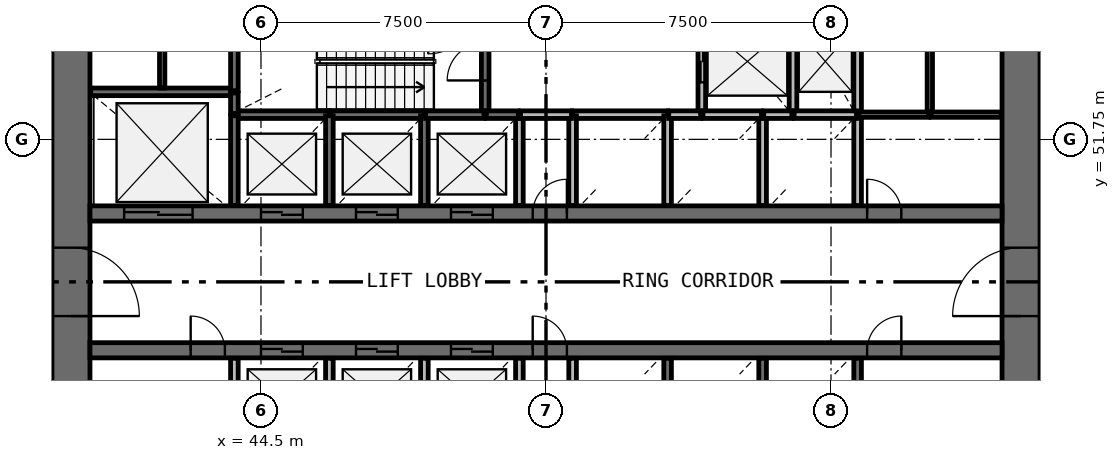
"""IFC4 building model, lengths in metres.
Left out: names, types, materials, properties, quantities, classifications, styles, units other than length and angle.
Written with IfcOpenShell. Run it as: python <this file> out.ifc"""

import sys

from ifc_helpers import new_model, si_unit, direction, frame, frame_2d, origin, place, context, subcontext, project, spatial, rectangle, extrude, source, transform, mapped, element, fill, save


model = new_model("IFC4")
c1 = context("Model", 3, precision=1e-05, world=origin(), true_north=direction((0.0, 1.0)))
c2 = subcontext(c1, "Body", "Model", "MODEL_VIEW")
j1 = project(units=[si_unit("LENGTHUNIT", "METRE"), si_unit("PLANEANGLEUNIT", "RADIAN")], contexts=[c1])
p1 = place(None, origin())
s1 = spatial("IfcSite", under=j1, at=p1, CompositionType="ELEMENT")
p2 = place(p1, origin())
s2 = spatial("IfcBuilding", under=s1, at=p2, CompositionType="ELEMENT")
p3 = place(p2, frame((0.0, 0.0, 22.6)))
s3 = spatial("IfcBuildingStorey", under=s2, at=p3, CompositionType="ELEMENT", Elevation=22.6)
p4 = place(p3, frame((64.5, 38.0, 0.0), z_axis=(0.0, 0.0, 1.0), x_axis=(0.0, 1.0, 0.0)))
e1 = element("IfcWall", 1, at=p4, inside=s3, PredefinedType="SHEAR", context=c2, shape_type="SweptSolid", body=[
    extrude(rectangle(XDim=20.0, YDim=1.0, at=frame_2d((10.0, 0.0))), origin(), (0.0, 0.0, 1.0), 4.4),
])
p5 = place(p4, frame((9.1, 0.0, 0.0)))
e2 = element("IfcOpeningElement", 2, at=p5, cuts=e1, PredefinedType="OPENING", context=c2, shape_type="SweptSolid", body=[
    extrude(rectangle(XDim=1.8, YDim=2.1, at=frame_2d((0.9, 1.05))), frame((0.0, 0.51, 0.0), z_axis=(0.0, -1.0, 0.0), x_axis=(1.0, 0.0, 0.0)), (0.0, 0.0, 1.0), 1.02),
])
p6 = place(p3, frame((39.5, 58.0, 0.0), z_axis=(0.0, 0.0, 1.0), x_axis=(0.0, -1.0, 0.0)))
e3 = element("IfcWall", 3, at=p6, inside=s3, PredefinedType="SHEAR", context=c2, shape_type="SweptSolid", body=[
    extrude(rectangle(XDim=20.0, YDim=1.0, at=frame_2d((10.0, 0.0))), origin(), (0.0, 0.0, 1.0), 4.4),
])
p7 = place(p6, frame((9.1, 0.0, 0.0)))
e4 = element("IfcOpeningElement", 4, at=p7, cuts=e3, PredefinedType="OPENING", context=c2, shape_type="SweptSolid", body=[
    extrude(rectangle(XDim=1.8, YDim=2.1, at=frame_2d((0.9, 1.05))), frame((0.0, 0.51, 0.0), z_axis=(0.0, -1.0, 0.0), x_axis=(1.0, 0.0, 0.0)), (0.0, 0.0, 1.0), 1.02),
])
p8 = place(p3, frame((40.0, 49.8, 0.0), z_axis=(0.0, 0.0, 1.0), x_axis=(1.0, 0.0, 0.0)))
e5 = element("IfcWall", 5, at=p8, inside=s3, PredefinedType="SHEAR", context=c2, shape_type="SweptSolid", body=[
    extrude(rectangle(XDim=24.0, YDim=0.4, at=frame_2d((12.0, 0.0))), origin(), (0.0, 0.0, 1.0), 4.4),
])
p9 = place(p8, frame((4.5, 0.0, 0.0)))
e6 = element("IfcOpeningElement", 6, at=p9, cuts=e5, PredefinedType="OPENING", context=c2, shape_type="SweptSolid", body=[
    extrude(rectangle(XDim=1.1, YDim=2.1, at=frame_2d((0.55, 1.05))), frame((0.0, 0.21, 0.0), z_axis=(0.0, -1.0, 0.0), x_axis=(1.0, 0.0, 0.0)), (0.0, 0.0, 1.0), 0.42),
])
p10 = place(p8, frame((7.0, 0.0, 0.0)))
e7 = element("IfcOpeningElement", 7, at=p10, cuts=e5, PredefinedType="OPENING", context=c2, shape_type="SweptSolid", body=[
    extrude(rectangle(XDim=1.1, YDim=2.1, at=frame_2d((0.55, 1.05))), frame((0.0, 0.21, 0.0), z_axis=(0.0, -1.0, 0.0), x_axis=(1.0, 0.0, 0.0)), (0.0, 0.0, 1.0), 0.42),
])
p11 = place(p8, frame((9.5, 0.0, 0.0)))
e8 = element("IfcOpeningElement", 8, at=p11, cuts=e5, PredefinedType="OPENING", context=c2, shape_type="SweptSolid", body=[
    extrude(rectangle(XDim=1.1, YDim=2.1, at=frame_2d((0.55, 1.05))), frame((0.0, 0.21, 0.0), z_axis=(0.0, -1.0, 0.0), x_axis=(1.0, 0.0, 0.0)), (0.0, 0.0, 1.0), 0.42),
])
p12 = place(p8, frame((0.9, 0.0, 0.0)))
e9 = element("IfcOpeningElement", 9, at=p12, cuts=e5, PredefinedType="OPENING", context=c2, shape_type="SweptSolid", body=[
    extrude(rectangle(XDim=1.8, YDim=2.4, at=frame_2d((0.9, 1.2))), frame((0.0, 0.21, 0.0), z_axis=(0.0, -1.0, 0.0), x_axis=(1.0, 0.0, 0.0)), (0.0, 0.0, 1.0), 0.42),
])
p13 = place(p8, frame((20.45, 0.0, 0.0)))
e10 = element("IfcOpeningElement", 10, at=p13, cuts=e5, PredefinedType="OPENING", context=c2, shape_type="SweptSolid", body=[
    extrude(rectangle(XDim=0.9, YDim=2.1, at=frame_2d((0.45, 1.05))), frame((0.0, 0.21, 0.0), z_axis=(0.0, -1.0, 0.0), x_axis=(1.0, 0.0, 0.0)), (0.0, 0.0, 1.0), 0.42),
])
p14 = place(p8, frame((11.65, 0.0, 0.0)))
e11 = element("IfcOpeningElement", 11, at=p14, cuts=e5, PredefinedType="OPENING", context=c2, shape_type="SweptSolid", body=[
    extrude(rectangle(XDim=0.9, YDim=2.1, at=frame_2d((0.45, 1.05))), frame((0.0, 0.21, 0.0), z_axis=(0.0, -1.0, 0.0), x_axis=(1.0, 0.0, 0.0)), (0.0, 0.0, 1.0), 0.42),
])
p15 = place(p3, frame((40.0, 46.2, 0.0), z_axis=(0.0, 0.0, 1.0), x_axis=(1.0, 0.0, 0.0)))
e12 = element("IfcWall", 12, at=p15, inside=s3, PredefinedType="SHEAR", context=c2, shape_type="SweptSolid", body=[
    extrude(rectangle(XDim=24.0, YDim=0.4, at=frame_2d((12.0, 0.0))), origin(), (0.0, 0.0, 1.0), 4.4),
])
p16 = place(p15, frame((4.5, 0.0, 0.0)))
e13 = element("IfcOpeningElement", 13, at=p16, cuts=e12, PredefinedType="OPENING", context=c2, shape_type="SweptSolid", body=[
    extrude(rectangle(XDim=1.1, YDim=2.1, at=frame_2d((0.55, 1.05))), frame((0.0, 0.21, 0.0), z_axis=(0.0, -1.0, 0.0), x_axis=(1.0, 0.0, 0.0)), (0.0, 0.0, 1.0), 0.42),
])
p17 = place(p15, frame((7.0, 0.0, 0.0)))
e14 = element("IfcOpeningElement", 14, at=p17, cuts=e12, PredefinedType="OPENING", context=c2, shape_type="SweptSolid", body=[
    extrude(rectangle(XDim=1.1, YDim=2.1, at=frame_2d((0.55, 1.05))), frame((0.0, 0.21, 0.0), z_axis=(0.0, -1.0, 0.0), x_axis=(1.0, 0.0, 0.0)), (0.0, 0.0, 1.0), 0.42),
])
p18 = place(p15, frame((9.5, 0.0, 0.0)))
e15 = element("IfcOpeningElement", 15, at=p18, cuts=e12, PredefinedType="OPENING", context=c2, shape_type="SweptSolid", body=[
    extrude(rectangle(XDim=1.1, YDim=2.1, at=frame_2d((0.55, 1.05))), frame((0.0, 0.21, 0.0), z_axis=(0.0, -1.0, 0.0), x_axis=(1.0, 0.0, 0.0)), (0.0, 0.0, 1.0), 0.42),
])
p19 = place(p15, frame((20.45, 0.0, 0.0)))
e16 = element("IfcOpeningElement", 16, at=p19, cuts=e12, PredefinedType="OPENING", context=c2, shape_type="SweptSolid", body=[
    extrude(rectangle(XDim=0.9, YDim=2.1, at=frame_2d((0.45, 1.05))), frame((0.0, 0.21, 0.0), z_axis=(0.0, -1.0, 0.0), x_axis=(1.0, 0.0, 0.0)), (0.0, 0.0, 1.0), 0.42),
])
p20 = place(p15, frame((2.65, 0.0, 0.0)))
e17 = element("IfcOpeningElement", 17, at=p20, cuts=e12, PredefinedType="OPENING", context=c2, shape_type="SweptSolid", body=[
    extrude(rectangle(XDim=0.9, YDim=2.1, at=frame_2d((0.45, 1.05))), frame((0.0, 0.21, 0.0), z_axis=(0.0, -1.0, 0.0), x_axis=(1.0, 0.0, 0.0)), (0.0, 0.0, 1.0), 0.42),
])
p21 = place(p15, frame((11.65, 0.0, 0.0)))
e18 = element("IfcOpeningElement", 18, at=p21, cuts=e12, PredefinedType="OPENING", context=c2, shape_type="SweptSolid", body=[
    extrude(rectangle(XDim=0.9, YDim=2.1, at=frame_2d((0.45, 1.05))), frame((0.0, 0.21, 0.0), z_axis=(0.0, -1.0, 0.0), x_axis=(1.0, 0.0, 0.0)), (0.0, 0.0, 1.0), 0.42),
])
p22 = place(p3, frame((43.8, 53.0, 0.0), z_axis=(0.0, 0.0, 1.0), x_axis=(-1.0, 0.0, 0.0)))
e19 = element("IfcWall", 19, at=p22, inside=s3, PredefinedType="SOLIDWALL", context=c2, shape_type="SweptSolid", body=[
    extrude(rectangle(XDim=3.78, YDim=0.2, at=frame_2d((1.89, 0.0))), origin(), (0.0, 0.0, 1.0), 3.95),
])
p23 = place(p3, frame((50.4, 52.4, 0.0), z_axis=(0.0, 0.0, 1.0), x_axis=(0.0, 1.0, 0.0)))
e20 = element("IfcWall", 20, at=p23, inside=s3, PredefinedType="SOLIDWALL", context=c2, shape_type="SweptSolid", body=[
    extrude(rectangle(XDim=2.77, YDim=0.2, at=frame_2d((1.385, 0.0))), origin(), (0.0, 0.0, 1.0), 3.95),
])
p24 = place(p23, frame((0.9, 0.0, 0.0)))
e21 = element("IfcOpeningElement", 21, at=p24, cuts=e20, PredefinedType="OPENING", context=c2, shape_type="SweptSolid", body=[
    extrude(rectangle(XDim=1.0, YDim=2.1, at=frame_2d((0.5, 1.05))), frame((0.0, 0.11, 0.0), z_axis=(0.0, -1.0, 0.0), x_axis=(1.0, 0.0, 0.0)), (0.0, 0.0, 1.0), 0.22),
])
p25 = place(p3, frame((56.1, 55.17, 0.0), z_axis=(0.0, 0.0, 1.0), x_axis=(0.0, -1.0, 0.0)))
e22 = element("IfcWall", 22, at=p25, inside=s3, PredefinedType="SOLIDWALL", context=c2, shape_type="SweptSolid", body=[
    extrude(rectangle(XDim=2.77, YDim=0.2, at=frame_2d((1.385, 0.0))), origin(), (0.0, 0.0, 1.0), 3.95),
])
p26 = place(p25, frame((0.82, 0.0, 0.0)))
e23 = element("IfcOpeningElement", 23, at=p26, cuts=e22, PredefinedType="OPENING", context=c2, shape_type="SweptSolid", body=[
    extrude(rectangle(XDim=1.1, YDim=2.1, at=frame_2d((0.55, 1.05))), frame((0.0, 0.11, 0.0), z_axis=(0.0, -1.0, 0.0), x_axis=(1.0, 0.0, 0.0)), (0.0, 0.0, 1.0), 0.22),
])
for number, where, z_axis, x_axis in (
    (24, (58.5, 52.4, 0.0), (0.0, 0.0, 1.0), (0.0, 1.0, 0.0)),
    (25, (60.2, 52.4, 0.0), (0.0, 0.0, 1.0), (0.0, 1.0, 0.0)),
):
    element("IfcWall", number, at=place(p3, frame(where, z_axis=z_axis, x_axis=x_axis)), inside=s3, PredefinedType="SOLIDWALL", context=c2, shape_type="SweptSolid", body=[
        extrude(rectangle(XDim=2.8, YDim=0.2, at=frame_2d((1.4, 0.0))), origin(), (0.0, 0.0, 1.0), 3.95),
    ])
p27 = place(p3, frame((46.3, 52.4, 0.0), z_axis=(0.0, 0.0, 1.0), x_axis=(-1.0, 0.0, 0.0)))
e26 = element("IfcWall", 26, at=p27, inside=s3, PredefinedType="SOLIDWALL", context=c2, shape_type="SweptSolid", body=[
    extrude(rectangle(XDim=2.5, YDim=0.2, at=frame_2d((1.25, 0.0))), origin(), (0.0, 0.0, 1.0), 3.95),
])
p28 = place(p3, frame((48.8, 52.4, 0.0), z_axis=(0.0, 0.0, 1.0), x_axis=(-1.0, 0.0, 0.0)))
e27 = element("IfcWall", 27, at=p28, inside=s3, PredefinedType="SOLIDWALL", context=c2, shape_type="SweptSolid", body=[
    extrude(rectangle(XDim=2.47, YDim=0.2, at=frame_2d((1.235, 0.0))), origin(), (0.0, 0.0, 1.0), 3.95),
])
p29 = place(p3, frame((55.2, 52.4, 0.0), z_axis=(0.0, 0.0, 1.0), x_axis=(-1.0, 0.0, 0.0)))
e28 = element("IfcWall", 28, at=p29, inside=s3, PredefinedType="SOLIDWALL", context=c2, shape_type="SweptSolid", body=[
    extrude(rectangle(XDim=2.5, YDim=0.2, at=frame_2d((1.25, 0.0))), origin(), (0.0, 0.0, 1.0), 3.95),
])
for number, where, z_axis, x_axis in (
    (29, (43.8, 45.99, 0.0), (0.0, 0.0, 1.0), (0.0, -1.0, 0.0)),
    (30, (43.8, 52.37, 0.0), (0.0, 0.0, 1.0), (0.0, -1.0, 0.0)),
):
    element("IfcWall", number, at=place(p3, frame(where, z_axis=z_axis, x_axis=x_axis)), inside=s3, PredefinedType="SOLIDWALL", context=c2, shape_type="SweptSolid", body=[
        extrude(rectangle(XDim=2.36, YDim=0.2, at=frame_2d((1.18, 0.0))), origin(), (0.0, 0.0, 1.0), 3.95),
    ])
p30 = place(p3, frame((46.3, 43.6, 0.0), z_axis=(0.0, 0.0, 1.0), x_axis=(0.0, 1.0, 0.0)))
e31 = element("IfcWall", 31, at=p30, inside=s3, PredefinedType="SOLIDWALL", context=c2, shape_type="SweptSolid", body=[
    extrude(rectangle(XDim=2.39, YDim=0.2, at=frame_2d((1.195, 0.0))), origin(), (0.0, 0.0, 1.0), 3.95),
])
for number, where, z_axis, x_axis in (
    (32, (46.3, 50.01, 0.0), (0.0, 0.0, 1.0), (0.0, 1.0, 0.0)),
    (33, (48.8, 43.63, 0.0), (0.0, 0.0, 1.0), (0.0, 1.0, 0.0)),
    (34, (48.8, 50.01, 0.0), (0.0, 0.0, 1.0), (0.0, 1.0, 0.0)),
    (35, (51.3, 43.63, 0.0), (0.0, 0.0, 1.0), (0.0, 1.0, 0.0)),
):
    element("IfcWall", number, at=place(p3, frame(where, z_axis=z_axis, x_axis=x_axis)), inside=s3, PredefinedType="SOLIDWALL", context=c2, shape_type="SweptSolid", body=[
        extrude(rectangle(XDim=2.36, YDim=0.2, at=frame_2d((1.18, 0.0))), origin(), (0.0, 0.0, 1.0), 3.95),
    ])
for number, where, z_axis, x_axis in (
    (36, (51.3, 50.01, 0.0), (0.0, 0.0, 1.0), (0.0, 1.0, 0.0)),
    (37, (52.7, 45.99, 0.0), (0.0, 0.0, 1.0), (0.0, -1.0, 0.0)),
):
    element("IfcWall", number, at=place(p3, frame(where, z_axis=z_axis, x_axis=x_axis)), inside=s3, PredefinedType="SOLIDWALL", context=c2, shape_type="SweptSolid", body=[
        extrude(rectangle(XDim=2.39, YDim=0.2, at=frame_2d((1.195, 0.0))), origin(), (0.0, 0.0, 1.0), 3.95),
    ])
for number, where, z_axis, x_axis in (
    (38, (52.7, 52.37, 0.0), (0.0, 0.0, 1.0), (0.0, -1.0, 0.0)),
    (39, (55.2, 43.63, 0.0), (0.0, 0.0, 1.0), (0.0, 1.0, 0.0)),
    (40, (55.2, 50.01, 0.0), (0.0, 0.0, 1.0), (0.0, 1.0, 0.0)),
    (41, (57.7, 43.63, 0.0), (0.0, 0.0, 1.0), (0.0, 1.0, 0.0)),
):
    element("IfcWall", number, at=place(p3, frame(where, z_axis=z_axis, x_axis=x_axis)), inside=s3, PredefinedType="SOLIDWALL", context=c2, shape_type="SweptSolid", body=[
        extrude(rectangle(XDim=2.36, YDim=0.2, at=frame_2d((1.18, 0.0))), origin(), (0.0, 0.0, 1.0), 3.95),
    ])
p31 = place(p3, frame((57.7, 50.01, 0.0), z_axis=(0.0, 0.0, 1.0), x_axis=(0.0, 1.0, 0.0)))
e42 = element("IfcWall", 42, at=p31, inside=s3, PredefinedType="SOLIDWALL", context=c2, shape_type="SweptSolid", body=[
    extrude(rectangle(XDim=2.39, YDim=0.2, at=frame_2d((1.195, 0.0))), origin(), (0.0, 0.0, 1.0), 3.95),
])
for number, where, z_axis, x_axis in (
    (43, (60.2, 43.63, 0.0), (0.0, 0.0, 1.0), (0.0, 1.0, 0.0)),
    (44, (60.2, 50.01, 0.0), (0.0, 0.0, 1.0), (0.0, 1.0, 0.0)),
):
    element("IfcWall", number, at=place(p3, frame(where, z_axis=z_axis, x_axis=x_axis)), inside=s3, PredefinedType="SOLIDWALL", context=c2, shape_type="SweptSolid", body=[
        extrude(rectangle(XDim=2.36, YDim=0.2, at=frame_2d((1.18, 0.0))), origin(), (0.0, 0.0, 1.0), 3.95),
    ])
p32 = place(p3, frame((43.8, 55.17, 0.0), z_axis=(0.0, 0.0, 1.0), x_axis=(0.0, -1.0, 0.0)))
e45 = element("IfcWall", 45, at=p32, inside=s3, PredefinedType="SOLIDWALL", context=c2, shape_type="SweptSolid", body=[
    extrude(rectangle(XDim=2.14, YDim=0.2, at=frame_2d((1.07, 0.0))), origin(), (0.0, 0.0, 1.0), 3.95),
])
p33 = place(p3, frame((60.17, 52.4, 0.0), z_axis=(0.0, 0.0, 1.0), x_axis=(-1.0, 0.0, 0.0)))
e46 = element("IfcWall", 46, at=p33, inside=s3, PredefinedType="SOLIDWALL", context=c2, shape_type="SweptSolid", body=[
    extrude(rectangle(XDim=1.64, YDim=0.2, at=frame_2d((0.82, 0.0))), origin(), (0.0, 0.0, 1.0), 3.95),
])
for number, where, z_axis, x_axis in (
    (47, (50.37, 52.4, 0.0), (0.0, 0.0, 1.0), (-1.0, 0.0, 0.0)),
    (48, (57.67, 52.4, 0.0), (0.0, 0.0, 1.0), (-1.0, 0.0, 0.0)),
):
    element("IfcWall", number, at=place(p3, frame(where, z_axis=z_axis, x_axis=x_axis)), inside=s3, PredefinedType="SOLIDWALL", context=c2, shape_type="SweptSolid", body=[
        extrude(rectangle(XDim=1.54, YDim=0.2, at=frame_2d((0.77, 0.0))), origin(), (0.0, 0.0, 1.0), 3.95),
    ])
p34 = place(p3, frame((51.33, 52.4, 0.0), z_axis=(0.0, 0.0, 1.0), x_axis=(1.0, 0.0, 0.0)))
e49 = element("IfcWall", 49, at=p34, inside=s3, PredefinedType="SOLIDWALL", context=c2, shape_type="SweptSolid", body=[
    extrude(rectangle(XDim=1.34, YDim=0.2, at=frame_2d((0.67, 0.0))), origin(), (0.0, 0.0, 1.0), 3.95),
])
for number, where, z_axis, x_axis in (
    (50, (51.27, 52.4, 0.0), (0.0, 0.0, 1.0), (-1.0, 0.0, 0.0)),
    (51, (56.07, 52.4, 0.0), (0.0, 0.0, 1.0), (-1.0, 0.0, 0.0)),
):
    element("IfcWall", number, at=place(p3, frame(where, z_axis=z_axis, x_axis=x_axis)), inside=s3, PredefinedType="SOLIDWALL", context=c2, shape_type="SweptSolid", body=[
        extrude(rectangle(XDim=0.84, YDim=0.2, at=frame_2d((0.42, 0.0))), origin(), (0.0, 0.0, 1.0), 3.95),
    ])
p35 = place(p3, frame((58.47, 52.4, 0.0), z_axis=(0.0, 0.0, 1.0), x_axis=(-1.0, 0.0, 0.0)))
e52 = element("IfcWall", 52, at=p35, inside=s3, PredefinedType="SOLIDWALL", context=c2, shape_type="SweptSolid", body=[
    extrude(rectangle(XDim=0.74, YDim=0.2, at=frame_2d((0.37, 0.0))), origin(), (0.0, 0.0, 1.0), 3.95),
])
p36 = place(p3, frame((43.8, 52.43, 0.0), z_axis=(0.0, 0.0, 1.0), x_axis=(0.0, 1.0, 0.0)))
e53 = element("IfcWall", 53, at=p36, inside=s3, PredefinedType="SOLIDWALL", context=c2, shape_type="SweptSolid", body=[
    extrude(rectangle(XDim=0.54, YDim=0.2, at=frame_2d((0.27, 0.0))), origin(), (0.0, 0.0, 1.0), 3.95),
])
p37 = place(p3, frame((62.1, 52.4, 0.0), z_axis=(0.0, 0.0, 1.0), x_axis=(0.0, 1.0, 0.0)))
e54 = element("IfcWall", 54, at=p37, inside=s3, PredefinedType="PARTITIONING", context=c2, shape_type="SweptSolid", body=[
    extrude(rectangle(XDim=2.71, YDim=0.14, at=frame_2d((1.355, 0.0))), origin(), (0.0, 0.0, 1.0), 3.05),
])
p38 = place(p3, frame((41.9, 53.1, 0.0), z_axis=(0.0, 0.0, 1.0), x_axis=(0.0, 1.0, 0.0)))
e55 = element("IfcWall", 55, at=p38, inside=s3, PredefinedType="PARTITIONING", context=c2, shape_type="SweptSolid", body=[
    extrude(rectangle(XDim=2.01, YDim=0.14, at=frame_2d((1.005, 0.0))), origin(), (0.0, 0.0, 1.0), 3.05),
])
p39 = place(p3, frame((62.07, 52.4, 0.0), z_axis=(0.0, 0.0, 1.0), x_axis=(-1.0, 0.0, 0.0)))
e56 = element("IfcWall", 56, at=p39, inside=s3, PredefinedType="PARTITIONING", context=c2, shape_type="SweptSolid", body=[
    extrude(rectangle(XDim=1.84, YDim=0.14, at=frame_2d((0.92, 0.0))), origin(), (0.0, 0.0, 1.0), 3.05),
])
p40 = place(p3, frame((63.98, 52.4, 0.0), z_axis=(0.0, 0.0, 1.0), x_axis=(-1.0, 0.0, 0.0)))
e57 = element("IfcWall", 57, at=p40, inside=s3, PredefinedType="PARTITIONING", context=c2, shape_type="SweptSolid", body=[
    extrude(rectangle(XDim=1.85, YDim=0.14, at=frame_2d((0.925, 0.0))), origin(), (0.0, 0.0, 1.0), 3.05),
])
m1 = source(origin(), c2, "Body", "SweptSolid", [
    extrude(rectangle(XDim=1.8, YDim=2.1, at=frame_2d((0.9, 1.05))), frame((0.0, 0.025, 0.0), z_axis=(0.0, -1.0, 0.0), x_axis=(1.0, 0.0, 0.0)), (0.0, 0.0, 1.0), 0.05),
])
p41 = place(p7, origin())
e58 = element("IfcDoor", 58, at=p41, inside=s3, OperationType="SINGLE_SWING_RIGHT", PredefinedType="DOOR", context=c2, shape_type="MappedRepresentation", body=[
    mapped(m1, transform((0.0, 0.0, 0.0), scale=1.0)),
])
fill(e4, e58)
p42 = place(p5, origin())
e59 = element("IfcDoor", 59, at=p42, inside=s3, OperationType="SINGLE_SWING_LEFT", PredefinedType="DOOR", context=c2, shape_type="MappedRepresentation", body=[
    mapped(m1, transform((0.0, 0.0, 0.0), scale=1.0)),
])
fill(e2, e59)
m2 = source(origin(), c2, "Body", "SweptSolid", [
    extrude(rectangle(XDim=1.1, YDim=2.1, at=frame_2d((0.55, 1.05))), frame((0.0, 0.025, 0.0), z_axis=(0.0, -1.0, 0.0), x_axis=(1.0, 0.0, 0.0)), (0.0, 0.0, 1.0), 0.05),
])
p43 = place(p9, origin())
e60 = element("IfcDoor", 60, at=p43, inside=s3, OperationType="DOUBLE_DOOR_SLIDING", PredefinedType="USERDEFINED", context=c2, shape_type="MappedRepresentation", body=[
    mapped(m2, transform((0.0, 0.0, 0.0), scale=1.0)),
])
fill(e6, e60)
p44 = place(p10, origin())
e61 = element("IfcDoor", 61, at=p44, inside=s3, OperationType="DOUBLE_DOOR_SLIDING", PredefinedType="USERDEFINED", context=c2, shape_type="MappedRepresentation", body=[
    mapped(m2, transform((0.0, 0.0, 0.0), scale=1.0)),
])
fill(e7, e61)
p45 = place(p11, origin())
e62 = element("IfcDoor", 62, at=p45, inside=s3, OperationType="DOUBLE_DOOR_SLIDING", PredefinedType="USERDEFINED", context=c2, shape_type="MappedRepresentation", body=[
    mapped(m2, transform((0.0, 0.0, 0.0), scale=1.0)),
])
fill(e8, e62)
p46 = place(p16, origin())
e63 = element("IfcDoor", 63, at=p46, inside=s3, OperationType="DOUBLE_DOOR_SLIDING", PredefinedType="USERDEFINED", context=c2, shape_type="MappedRepresentation", body=[
    mapped(m2, transform((0.0, 0.0, 0.0), scale=1.0)),
])
fill(e13, e63)
p47 = place(p17, origin())
e64 = element("IfcDoor", 64, at=p47, inside=s3, OperationType="DOUBLE_DOOR_SLIDING", PredefinedType="USERDEFINED", context=c2, shape_type="MappedRepresentation", body=[
    mapped(m2, transform((0.0, 0.0, 0.0), scale=1.0)),
])
fill(e14, e64)
p48 = place(p18, origin())
e65 = element("IfcDoor", 65, at=p48, inside=s3, OperationType="DOUBLE_DOOR_SLIDING", PredefinedType="USERDEFINED", context=c2, shape_type="MappedRepresentation", body=[
    mapped(m2, transform((0.0, 0.0, 0.0), scale=1.0)),
])
fill(e15, e65)
p49 = place(p26, origin())
e66 = element("IfcDoor", 66, at=p49, inside=s3, OperationType="DOUBLE_DOOR_SLIDING", PredefinedType="USERDEFINED", context=c2, shape_type="MappedRepresentation", body=[
    mapped(m2, transform((0.0, 0.0, 0.0), scale=1.0)),
])
fill(e23, e66)
m3 = source(origin(), c2, "Body", "SweptSolid", [
    extrude(rectangle(XDim=1.8, YDim=2.4, at=frame_2d((0.9, 1.2))), frame((0.0, 0.025, 0.0), z_axis=(0.0, -1.0, 0.0), x_axis=(1.0, 0.0, 0.0)), (0.0, 0.0, 1.0), 0.05),
])
p50 = place(p12, origin())
e67 = element("IfcDoor", 67, at=p50, inside=s3, OperationType="DOUBLE_DOOR_SLIDING", PredefinedType="USERDEFINED", context=c2, shape_type="MappedRepresentation", body=[
    mapped(m3, transform((0.0, 0.0, 0.0), scale=1.0)),
])
fill(e9, e67)
m4 = source(origin(), c2, "Body", "SweptSolid", [
    extrude(rectangle(XDim=1.0, YDim=2.1, at=frame_2d((0.5, 1.05))), frame((0.0, 0.025, 0.0), z_axis=(0.0, -1.0, 0.0), x_axis=(1.0, 0.0, 0.0)), (0.0, 0.0, 1.0), 0.05),
])
p51 = place(p24, origin())
e68 = element("IfcDoor", 68, at=p51, inside=s3, OperationType="SINGLE_SWING_LEFT", PredefinedType="DOOR", context=c2, shape_type="MappedRepresentation", body=[
    mapped(m4, transform((0.0, 0.0, 0.0), scale=1.0)),
])
fill(e21, e68)
m5 = source(origin(), c2, "Body", "SweptSolid", [
    extrude(rectangle(XDim=0.9, YDim=2.1, at=frame_2d((0.45, 1.05))), frame((0.0, 0.025, 0.0), z_axis=(0.0, -1.0, 0.0), x_axis=(1.0, 0.0, 0.0)), (0.0, 0.0, 1.0), 0.05),
])
p52 = place(p19, origin())
e69 = element("IfcDoor", 69, at=p52, inside=s3, OperationType="SINGLE_SWING_RIGHT", PredefinedType="DOOR", context=c2, shape_type="MappedRepresentation", body=[
    mapped(m5, transform((0.0, 0.0, 0.0), scale=1.0)),
])
fill(e16, e69)
p53 = place(p13, origin())
e70 = element("IfcDoor", 70, at=p53, inside=s3, OperationType="SINGLE_SWING_LEFT", PredefinedType="DOOR", context=c2, shape_type="MappedRepresentation", body=[
    mapped(m5, transform((0.0, 0.0, 0.0), scale=1.0)),
])
fill(e10, e70)
p54 = place(p20, origin())
e71 = element("IfcDoor", 71, at=p54, inside=s3, OperationType="SINGLE_SWING_LEFT", PredefinedType="DOOR", context=c2, shape_type="MappedRepresentation", body=[
    mapped(m5, transform((0.0, 0.0, 0.0), scale=1.0)),
])
fill(e17, e71)
p55 = place(p14, origin())
e72 = element("IfcDoor", 72, at=p55, inside=s3, OperationType="SINGLE_SWING_RIGHT", PredefinedType="DOOR", context=c2, shape_type="MappedRepresentation", body=[
    mapped(m5, transform((0.0, 0.0, 0.0), scale=1.0)),
])
fill(e11, e72)
p56 = place(p21, origin())
e73 = element("IfcDoor", 73, at=p56, inside=s3, OperationType="SINGLE_SWING_LEFT", PredefinedType="DOOR", context=c2, shape_type="MappedRepresentation", body=[
    mapped(m5, transform((0.0, 0.0, 0.0), scale=1.0)),
])
fill(e18, e73)
save(model, sys.argv[1])
